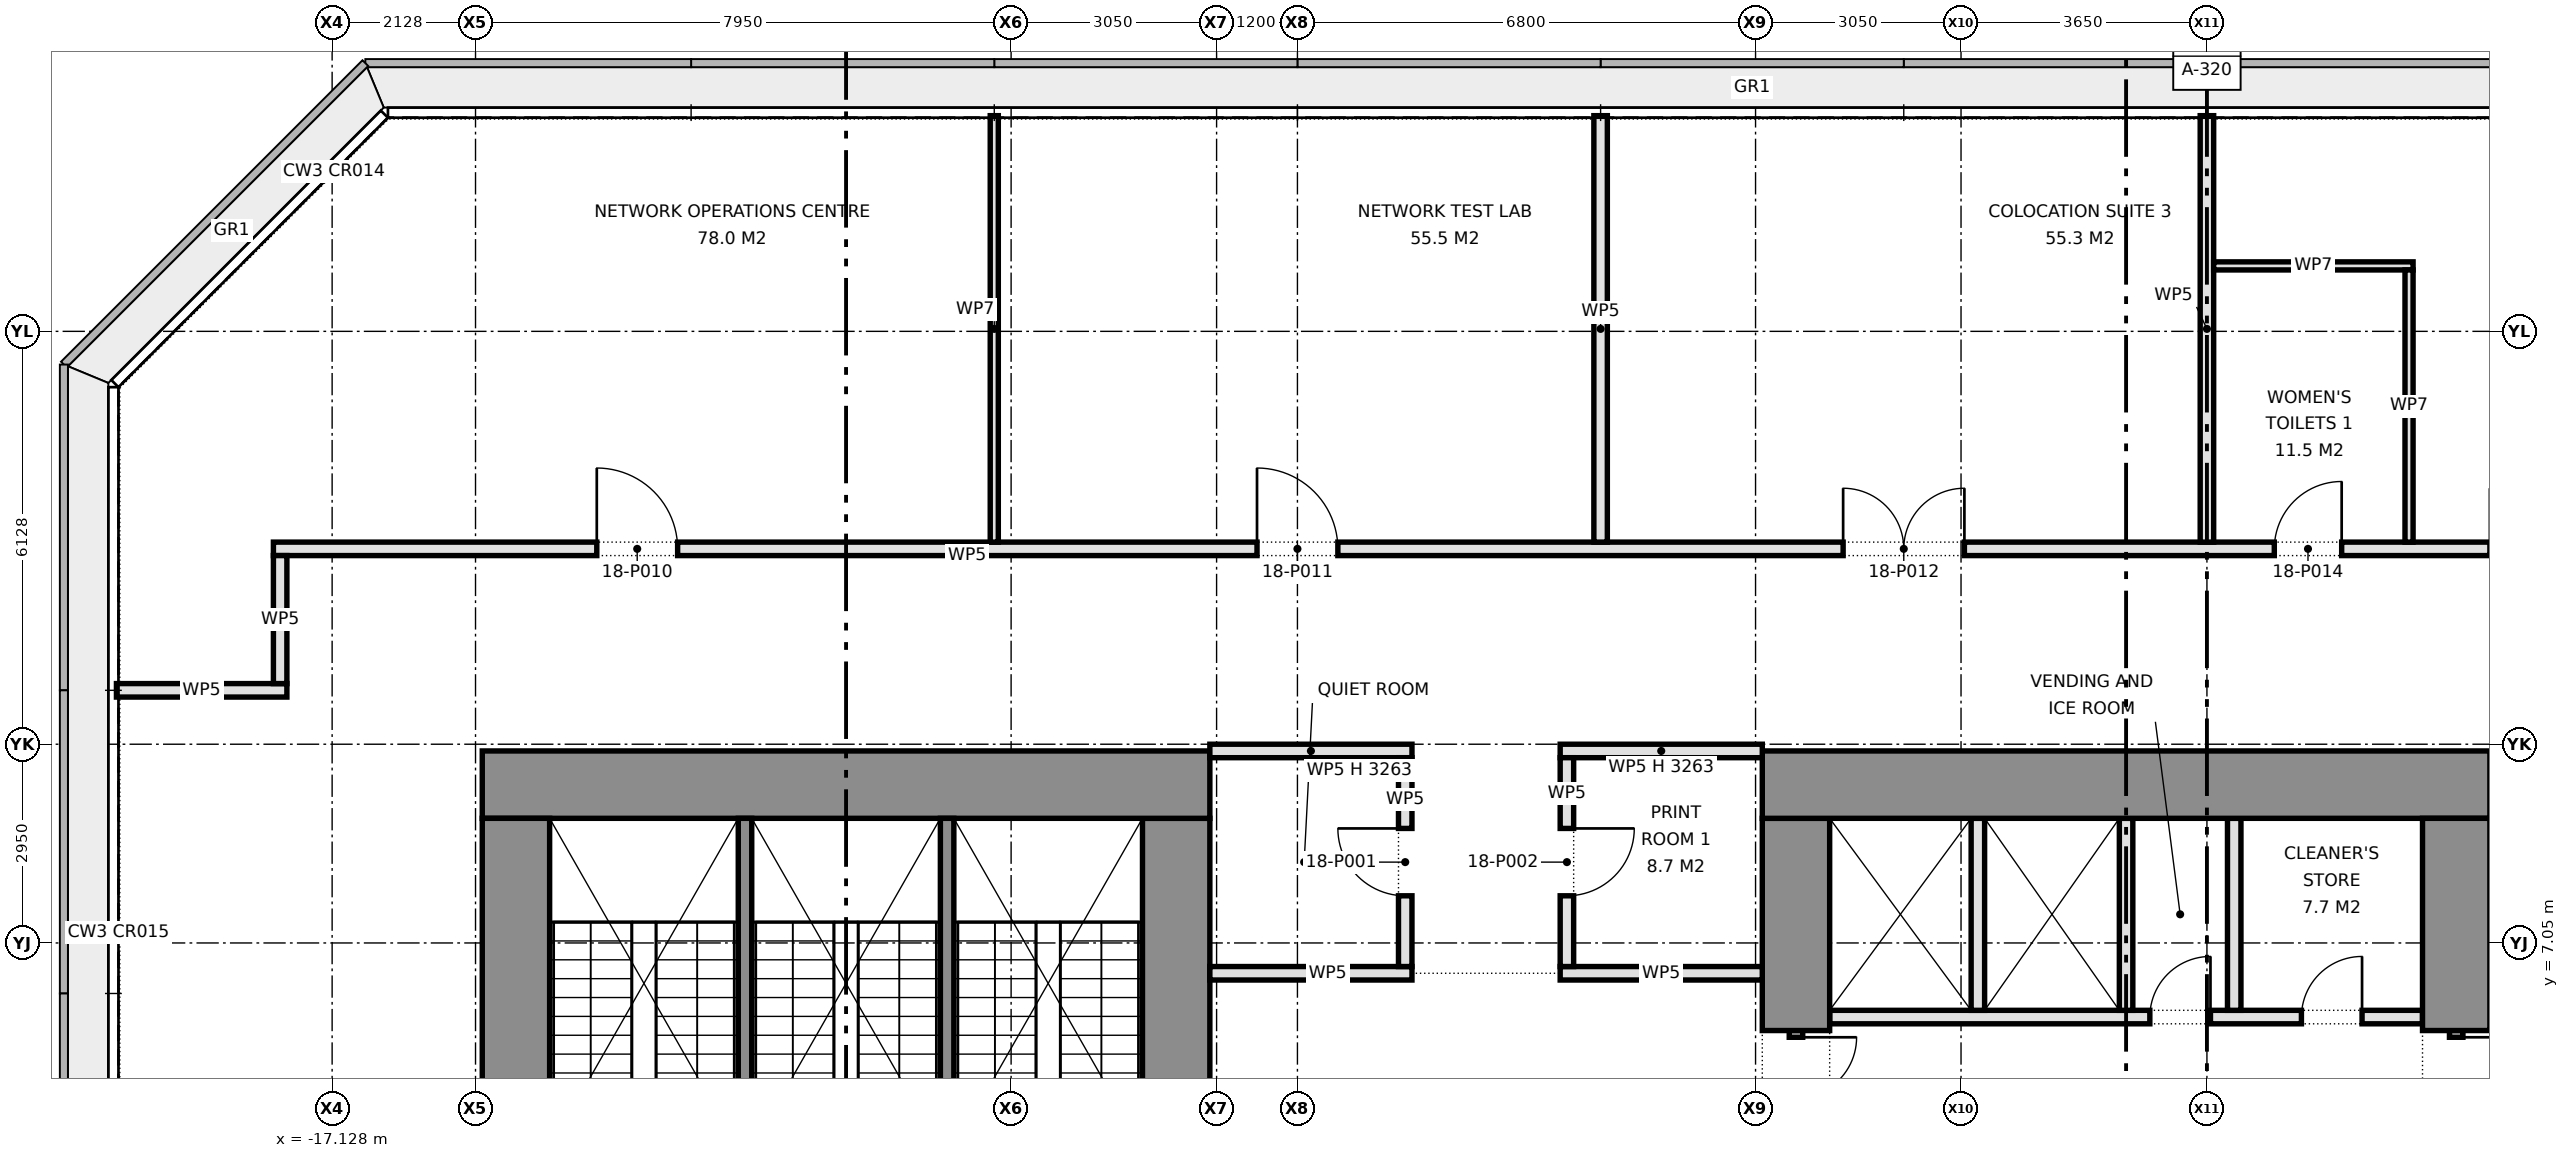
"""IFC4 building model, lengths in metres.
Left out: names, types, materials, properties, quantities, classifications, styles, units other than length and angle.
Written with IfcOpenShell. Run it as: python <this file> out.ifc"""

import sys

from ifc_helpers import new_model, si_unit, direction, frame, frame_2d, origin, place, context, subcontext, project, spatial, rectangle, extrude, element, fill, save


model = new_model("IFC4")
c1 = context("Model", 3, precision=1e-05, world=origin(), true_north=direction((0.0, 1.0)))
c2 = subcontext(c1, "Body", "Model", "MODEL_VIEW")
j1 = project(units=[si_unit("LENGTHUNIT", "METRE"), si_unit("PLANEANGLEUNIT", "RADIAN")], contexts=[c1])
p1 = place(None, origin())
s1 = spatial("IfcSite", under=j1, at=p1, CompositionType="ELEMENT")
p2 = place(p1, origin())
s2 = spatial("IfcBuilding", under=s1, at=p2, CompositionType="ELEMENT")
p3 = place(p2, frame((0.0, 0.0, 82.0)))
s3 = spatial("IfcBuildingStorey", under=s2, at=p3, CompositionType="ELEMENT", Elevation=82.0)
p4 = place(p3, frame((-14.9, 9.4, 0.0), z_axis=(0.0, 0.0, 1.0), x_axis=(1.0, 0.0, 0.0)))
e1 = element("IfcWall", 1, at=p4, inside=s3, PredefinedType="SHEAR", context=c2, shape_type="SweptSolid", body=[
    extrude(rectangle(XDim=10.8, YDim=1.0, at=frame_2d((5.4, 0.0))), origin(), (0.0, 0.0, 1.0), 4.2),
])
p5 = place(p3, frame((-14.4, 3.68, 0.0), z_axis=(0.0, 0.0, 1.0), x_axis=(0.0, 1.0, 0.0)))
e2 = element("IfcWall", 2, at=p5, inside=s3, PredefinedType="SHEAR", context=c2, shape_type="SweptSolid", body=[
    extrude(rectangle(XDim=5.22, YDim=1.0, at=frame_2d((2.61, 0.0))), origin(), (0.0, 0.0, 1.0), 4.2),
])
p6 = place(p3, frame((-4.6, 1.55, 0.0), z_axis=(0.0, 0.0, 1.0), x_axis=(0.0, 1.0, 0.0)))
e3 = element("IfcWall", 3, at=p6, inside=s3, PredefinedType="SHEAR", context=c2, shape_type="SweptSolid", body=[
    extrude(rectangle(XDim=7.35, YDim=1.0, at=frame_2d((3.675, 0.0))), origin(), (0.0, 0.0, 1.0), 4.2),
])
for number, where, z_axis, x_axis in (
    (4, (-11.0, 2.38, 0.0), (0.0, 0.0, 1.0), (0.0, 1.0, 0.0)),
    (5, (-8.0, 2.38, 0.0), (0.0, 0.0, 1.0), (0.0, 1.0, 0.0)),
):
    element("IfcWall", number, at=place(p3, frame(where, z_axis=z_axis, x_axis=x_axis)), inside=s3, PredefinedType="SHEAR", context=c2, shape_type="SweptSolid", body=[
        extrude(rectangle(XDim=6.52, YDim=0.2, at=frame_2d((3.26, 0.0))), origin(), (0.0, 0.0, 1.0), 4.2),
    ])
p7 = place(p3, frame((14.9, 9.4, 0.0), z_axis=(0.0, 0.0, 1.0), x_axis=(-1.0, 0.0, 0.0)))
e6 = element("IfcWall", 6, at=p7, inside=s3, PredefinedType="SHEAR", context=c2, shape_type="SweptSolid", body=[
    extrude(rectangle(XDim=10.8, YDim=1.0, at=frame_2d((5.4, 0.0))), origin(), (0.0, 0.0, 1.0), 4.2),
])
p8 = place(p3, frame((14.4, 8.9, 0.0), z_axis=(0.0, 0.0, 1.0), x_axis=(0.0, -1.0, 0.0)))
e7 = element("IfcWall", 7, at=p8, inside=s3, PredefinedType="SHEAR", context=c2, shape_type="SweptSolid", body=[
    extrude(rectangle(XDim=3.15, YDim=1.0, at=frame_2d((1.575, 0.0))), origin(), (0.0, 0.0, 1.0), 4.2),
])
p9 = place(p3, frame((14.4, 5.75, 0.0), z_axis=(0.0, 0.0, 1.0), x_axis=(0.0, -1.0, 0.0)))
e8 = element("IfcWall", 8, at=p9, inside=s3, PredefinedType="PARTITIONING", context=c2, shape_type="SweptSolid", body=[
    extrude(rectangle(XDim=2.0, YDim=0.2, at=frame_2d((1.0, 0.0))), origin(), (0.0, 0.0, 1.0), 2.4),
])
p10 = place(p9, frame((0.1, 0.0, 0.0)))
e9 = element("IfcOpeningElement", 9, at=p10, cuts=e8, PredefinedType="OPENING", context=c2, shape_type="SweptSolid", body=[
    extrude(rectangle(XDim=1.8, YDim=2.1, at=frame_2d((0.9, 1.05))), frame((0.0, 0.11, 0.0), z_axis=(0.0, -1.0, 0.0), x_axis=(1.0, 0.0, 0.0)), (0.0, 0.0, 1.0), 0.22),
])
p11 = place(p3, frame((4.6, 8.9, 0.0), z_axis=(0.0, 0.0, 1.0), x_axis=(0.0, -1.0, 0.0)))
e10 = element("IfcWall", 10, at=p11, inside=s3, PredefinedType="SHEAR", context=c2, shape_type="SweptSolid", body=[
    extrude(rectangle(XDim=3.15, YDim=1.0, at=frame_2d((1.575, 0.0))), origin(), (0.0, 0.0, 1.0), 4.2),
])
p12 = place(p3, frame((4.6, 5.75, 0.0), z_axis=(0.0, 0.0, 1.0), x_axis=(0.0, -1.0, 0.0)))
e11 = element("IfcWall", 11, at=p12, inside=s3, PredefinedType="PARTITIONING", context=c2, shape_type="SweptSolid", body=[
    extrude(rectangle(XDim=2.0, YDim=0.2, at=frame_2d((1.0, 0.0))), origin(), (0.0, 0.0, 1.0), 2.4),
])
p13 = place(p12, frame((0.1, 0.0, 0.0)))
e12 = element("IfcOpeningElement", 12, at=p13, cuts=e11, PredefinedType="OPENING", context=c2, shape_type="SweptSolid", body=[
    extrude(rectangle(XDim=1.8, YDim=2.1, at=frame_2d((0.9, 1.05))), frame((0.0, 0.11, 0.0), z_axis=(0.0, -1.0, 0.0), x_axis=(1.0, 0.0, 0.0)), (0.0, 0.0, 1.0), 0.22),
])
p14 = place(p3, frame((13.9, 5.95, 0.0), z_axis=(0.0, 0.0, 1.0), x_axis=(-1.0, 0.0, 0.0)))
e13 = element("IfcWall", 13, at=p14, inside=s3, PredefinedType="PARTITIONING", context=c2, shape_type="SweptSolid", body=[
    extrude(rectangle(XDim=8.8, YDim=0.2, at=frame_2d((4.4, 0.0))), origin(), (0.0, 0.0, 1.0), 4.2),
])
p15 = place(p14, frame((0.897, 0.0, 0.0)))
e14 = element("IfcOpeningElement", 14, at=p15, cuts=e13, PredefinedType="OPENING", context=c2, shape_type="SweptSolid", body=[
    extrude(rectangle(XDim=0.9, YDim=2.1, at=frame_2d((0.45, 1.05))), frame((0.0, 0.11, 0.0), z_axis=(0.0, -1.0, 0.0), x_axis=(1.0, 0.0, 0.0)), (0.0, 0.0, 1.0), 0.22),
])
p16 = place(p14, frame((3.147, 0.0, 0.0)))
e15 = element("IfcOpeningElement", 15, at=p16, cuts=e13, PredefinedType="OPENING", context=c2, shape_type="SweptSolid", body=[
    extrude(rectangle(XDim=0.9, YDim=2.1, at=frame_2d((0.45, 1.05))), frame((0.0, 0.11, 0.0), z_axis=(0.0, -1.0, 0.0), x_axis=(1.0, 0.0, 0.0)), (0.0, 0.0, 1.0), 0.22),
])
for number, where, z_axis, x_axis in (
    (16, (9.5, 8.9, 0.0), (0.0, 0.0, 1.0), (0.0, -1.0, 0.0)),
    (17, (7.3, 8.9, 0.0), (0.0, 0.0, 1.0), (0.0, -1.0, 0.0)),
    (18, (11.105, 8.9, 0.0), (0.0, 0.0, 1.0), (0.0, -1.0, 0.0)),
):
    element("IfcWall", number, at=place(p3, frame(where, z_axis=z_axis, x_axis=x_axis)), inside=s3, PredefinedType="PARTITIONING", context=c2, shape_type="SweptSolid", body=[
        extrude(rectangle(XDim=2.85, YDim=0.2, at=frame_2d((1.425, 0.0))), origin(), (0.0, 0.0, 1.0), 4.2),
    ])
for number, where, z_axis, x_axis in (
    (19, (-4.1, 6.6, 0.0), (0.0, 0.0, 1.0), (1.0, 0.0, 0.0)),
    (20, (1.1, 6.6, 0.0), (0.0, 0.0, 1.0), (1.0, 0.0, 0.0)),
):
    element("IfcWall", number, at=place(p3, frame(where, z_axis=z_axis, x_axis=x_axis)), inside=s3, PredefinedType="PARTITIONING", context=c2, shape_type="SweptSolid", body=[
        extrude(rectangle(XDim=3.0, YDim=0.2, at=frame_2d((1.5, 0.0))), origin(), (0.0, 0.0, 1.0), 4.2),
    ])
for number, where, z_axis, x_axis in (
    (21, (-4.1, 9.9, 0.0), (0.0, 0.0, 1.0), (1.0, 0.0, 0.0)),
    (22, (1.1, 9.9, 0.0), (0.0, 0.0, 1.0), (1.0, 0.0, 0.0)),
):
    element("IfcWall", number, at=place(p3, frame(where, z_axis=z_axis, x_axis=x_axis)), inside=s3, PredefinedType="PARTITIONING", context=c2, shape_type="SweptSolid", body=[
        extrude(rectangle(XDim=3.0, YDim=0.2, at=frame_2d((1.5, 0.0))), origin(), (0.0, 0.0, 1.0), 3.263),
    ])
p17 = place(p3, frame((-20.33, 10.8, 0.0), z_axis=(0.0, 0.0, 1.0), x_axis=(1.0, 0.0, 0.0)))
e23 = element("IfcWall", 23, at=p17, inside=s3, PredefinedType="PARTITIONING", context=c2, shape_type="SweptSolid", body=[
    extrude(rectangle(XDim=2.53, YDim=0.2, at=frame_2d((1.265, 0.0))), origin(), (0.0, 0.0, 1.0), 4.2),
])
p18 = place(p3, frame((-18.0, 12.9, 0.0), z_axis=(0.0, 0.0, 1.0), x_axis=(1.0, 0.0, 0.0)))
e24 = element("IfcWall", 24, at=p18, inside=s3, PredefinedType="PARTITIONING", context=c2, shape_type="SweptSolid", body=[
    extrude(rectangle(XDim=36.0, YDim=0.2, at=frame_2d((18.0, 0.0))), origin(), (0.0, 0.0, 1.0), 4.2),
])
p19 = place(p18, frame((4.8, 0.0, 0.0)))
e25 = element("IfcOpeningElement", 25, at=p19, cuts=e24, PredefinedType="OPENING", context=c2, shape_type="SweptSolid", body=[
    extrude(rectangle(XDim=1.2, YDim=2.1, at=frame_2d((0.6, 1.05))), frame((0.0, 0.11, 0.0), z_axis=(0.0, -1.0, 0.0), x_axis=(1.0, 0.0, 0.0)), (0.0, 0.0, 1.0), 0.22),
])
p20 = place(p18, frame((14.6, 0.0, 0.0)))
e26 = element("IfcOpeningElement", 26, at=p20, cuts=e24, PredefinedType="OPENING", context=c2, shape_type="SweptSolid", body=[
    extrude(rectangle(XDim=1.2, YDim=2.1, at=frame_2d((0.6, 1.05))), frame((0.0, 0.11, 0.0), z_axis=(0.0, -1.0, 0.0), x_axis=(1.0, 0.0, 0.0)), (0.0, 0.0, 1.0), 0.22),
])
p21 = place(p18, frame((23.3, 0.0, 0.0)))
e27 = element("IfcOpeningElement", 27, at=p21, cuts=e24, PredefinedType="OPENING", context=c2, shape_type="SweptSolid", body=[
    extrude(rectangle(XDim=1.8, YDim=2.1, at=frame_2d((0.9, 1.05))), frame((0.0, 0.11, 0.0), z_axis=(0.0, -1.0, 0.0), x_axis=(1.0, 0.0, 0.0)), (0.0, 0.0, 1.0), 0.22),
])
p22 = place(p18, frame((32.9, 0.0, 0.0)))
e28 = element("IfcOpeningElement", 28, at=p22, cuts=e24, PredefinedType="OPENING", context=c2, shape_type="SweptSolid", body=[
    extrude(rectangle(XDim=1.8, YDim=2.1, at=frame_2d((0.9, 1.05))), frame((0.0, 0.11, 0.0), z_axis=(0.0, -1.0, 0.0), x_axis=(1.0, 0.0, 0.0)), (0.0, 0.0, 1.0), 0.22),
])
p23 = place(p18, frame((29.7, 0.0, 0.0)))
e29 = element("IfcOpeningElement", 29, at=p23, cuts=e24, PredefinedType="OPENING", context=c2, shape_type="SweptSolid", body=[
    extrude(rectangle(XDim=1.0, YDim=2.1, at=frame_2d((0.5, 1.05))), frame((0.0, 0.11, 0.0), z_axis=(0.0, -1.0, 0.0), x_axis=(1.0, 0.0, 0.0)), (0.0, 0.0, 1.0), 0.22),
])
for number, where, z_axis, x_axis in (
    (30, (10.7, 13.0, 0.0), (0.0, 0.0, 1.0), (0.0, 1.0, 0.0)),
    (31, (1.7, 13.0, 0.0), (0.0, 0.0, 1.0), (0.0, 1.0, 0.0)),
):
    element("IfcWall", number, at=place(p3, frame(where, z_axis=z_axis, x_axis=x_axis)), inside=s3, PredefinedType="PARTITIONING", context=c2, shape_type="SweptSolid", body=[
        extrude(rectangle(XDim=6.33, YDim=0.2, at=frame_2d((3.165, 0.0))), origin(), (0.0, 0.0, 1.0), 4.2),
    ])
p24 = place(p3, frame((1.2, 6.7, 0.0), z_axis=(0.0, 0.0, 1.0), x_axis=(0.0, 1.0, 0.0)))
e32 = element("IfcWall", 32, at=p24, inside=s3, PredefinedType="PARTITIONING", context=c2, shape_type="SweptSolid", body=[
    extrude(rectangle(XDim=3.1, YDim=0.2, at=frame_2d((1.55, 0.0))), origin(), (0.0, 0.0, 1.0), 4.2),
])
p25 = place(p24, frame((1.05, 0.0, 0.0)))
e33 = element("IfcOpeningElement", 33, at=p25, cuts=e32, PredefinedType="OPENING", context=c2, shape_type="SweptSolid", body=[
    extrude(rectangle(XDim=1.0, YDim=2.1, at=frame_2d((0.5, 1.05))), frame((0.0, 0.11, 0.0), z_axis=(0.0, -1.0, 0.0), x_axis=(1.0, 0.0, 0.0)), (0.0, 0.0, 1.0), 0.22),
])
p26 = place(p3, frame((-1.2, 6.7, 0.0), z_axis=(0.0, 0.0, 1.0), x_axis=(0.0, 1.0, 0.0)))
e34 = element("IfcWall", 34, at=p26, inside=s3, PredefinedType="PARTITIONING", context=c2, shape_type="SweptSolid", body=[
    extrude(rectangle(XDim=3.1, YDim=0.2, at=frame_2d((1.55, 0.0))), origin(), (0.0, 0.0, 1.0), 4.2),
])
p27 = place(p26, frame((1.05, 0.0, 0.0)))
e35 = element("IfcOpeningElement", 35, at=p27, cuts=e34, PredefinedType="OPENING", context=c2, shape_type="SweptSolid", body=[
    extrude(rectangle(XDim=1.0, YDim=2.1, at=frame_2d((0.5, 1.05))), frame((0.0, 0.11, 0.0), z_axis=(0.0, -1.0, 0.0), x_axis=(1.0, 0.0, 0.0)), (0.0, 0.0, 1.0), 0.22),
])
p28 = place(p3, frame((-17.9, 10.9, 0.0), z_axis=(0.0, 0.0, 1.0), x_axis=(0.0, 1.0, 0.0)))
e36 = element("IfcWall", 36, at=p28, inside=s3, PredefinedType="PARTITIONING", context=c2, shape_type="SweptSolid", body=[
    extrude(rectangle(XDim=1.9, YDim=0.2, at=frame_2d((0.95, 0.0))), origin(), (0.0, 0.0, 1.0), 4.2),
])
p29 = place(p3, frame((10.8, 17.1, 0.0), z_axis=(0.0, 0.0, 1.0), x_axis=(1.0, 0.0, 0.0)))
e37 = element("IfcWall", 37, at=p29, inside=s3, PredefinedType="PARTITIONING", context=c2, shape_type="SweptSolid", body=[
    extrude(rectangle(XDim=2.96, YDim=0.12, at=frame_2d((1.48, 0.0))), origin(), (0.0, 0.0, 1.0), 4.2),
])
p30 = place(p3, frame((13.7, 13.0, 0.0), z_axis=(0.0, 0.0, 1.0), x_axis=(0.0, 1.0, 0.0)))
e38 = element("IfcWall", 38, at=p30, inside=s3, PredefinedType="PARTITIONING", context=c2, shape_type="SweptSolid", body=[
    extrude(rectangle(XDim=4.04, YDim=0.12, at=frame_2d((2.02, 0.0))), origin(), (0.0, 0.0, 1.0), 4.2),
])
p31 = place(p3, frame((-7.3, 13.0, 0.0), z_axis=(0.0, 0.0, 1.0), x_axis=(0.0, 1.0, 0.0)))
e39 = element("IfcWall", 39, at=p31, inside=s3, PredefinedType="PARTITIONING", context=c2, shape_type="SweptSolid", body=[
    extrude(rectangle(XDim=6.33, YDim=0.12, at=frame_2d((3.165, 0.0))), origin(), (0.0, 0.0, 1.0), 4.2),
])
p32 = place(p10, origin())
e40 = element("IfcDoor", 40, at=p32, inside=s3, OperationType="DOUBLE_DOOR_SINGLE_SWING", PredefinedType="DOOR", context=c2, shape_type="SweptSolid", body=[
    extrude(rectangle(XDim=1.8, YDim=2.1, at=frame_2d((0.9, 1.05))), frame((0.0, 0.025, 0.0), z_axis=(0.0, -1.0, 0.0), x_axis=(1.0, 0.0, 0.0)), (0.0, 0.0, 1.0), 0.05),
])
fill(e9, e40)
p33 = place(p13, origin())
e41 = element("IfcDoor", 41, at=p33, inside=s3, OperationType="DOUBLE_DOOR_SINGLE_SWING", PredefinedType="DOOR", context=c2, shape_type="SweptSolid", body=[
    extrude(rectangle(XDim=1.8, YDim=2.1, at=frame_2d((0.9, 1.05))), frame((0.0, 0.025, 0.0), z_axis=(0.0, -1.0, 0.0), x_axis=(1.0, 0.0, 0.0)), (0.0, 0.0, 1.0), 0.05),
])
fill(e12, e41)
p34 = place(p15, frame((0.9, 0.0, 0.0), z_axis=(0.0, 0.0, 1.0), x_axis=(-1.0, 0.0, 0.0)))
e42 = element("IfcDoor", 42, at=p34, inside=s3, OperationType="SINGLE_SWING_RIGHT", PredefinedType="DOOR", context=c2, shape_type="SweptSolid", body=[
    extrude(rectangle(XDim=0.9, YDim=2.1, at=frame_2d((0.45, 1.05))), frame((0.0, 0.025, 0.0), z_axis=(0.0, -1.0, 0.0), x_axis=(1.0, 0.0, 0.0)), (0.0, 0.0, 1.0), 0.05),
])
fill(e14, e42)
p35 = place(p16, frame((0.9, 0.0, 0.0), z_axis=(0.0, 0.0, 1.0), x_axis=(-1.0, 0.0, 0.0)))
e43 = element("IfcDoor", 43, at=p35, inside=s3, OperationType="SINGLE_SWING_RIGHT", PredefinedType="DOOR", context=c2, shape_type="SweptSolid", body=[
    extrude(rectangle(XDim=0.9, YDim=2.1, at=frame_2d((0.45, 1.05))), frame((0.0, 0.025, 0.0), z_axis=(0.0, -1.0, 0.0), x_axis=(1.0, 0.0, 0.0)), (0.0, 0.0, 1.0), 0.05),
])
fill(e15, e43)
p36 = place(p27, origin())
e44 = element("IfcDoor", 44, at=p36, inside=s3, OperationType="SINGLE_SWING_RIGHT", PredefinedType="DOOR", context=c2, shape_type="SweptSolid", body=[
    extrude(rectangle(XDim=1.0, YDim=2.1, at=frame_2d((0.5, 1.05))), frame((0.0, 0.025, 0.0), z_axis=(0.0, -1.0, 0.0), x_axis=(1.0, 0.0, 0.0)), (0.0, 0.0, 1.0), 0.05),
])
fill(e35, e44)
p37 = place(p25, frame((1.0, 0.0, 0.0), z_axis=(0.0, 0.0, 1.0), x_axis=(-1.0, 0.0, 0.0)))
e45 = element("IfcDoor", 45, at=p37, inside=s3, OperationType="SINGLE_SWING_LEFT", PredefinedType="DOOR", context=c2, shape_type="SweptSolid", body=[
    extrude(rectangle(XDim=1.0, YDim=2.1, at=frame_2d((0.5, 1.05))), frame((0.0, 0.025, 0.0), z_axis=(0.0, -1.0, 0.0), x_axis=(1.0, 0.0, 0.0)), (0.0, 0.0, 1.0), 0.05),
])
fill(e33, e45)
p38 = place(p19, origin())
e46 = element("IfcDoor", 46, at=p38, inside=s3, OperationType="SINGLE_SWING_LEFT", PredefinedType="DOOR", context=c2, shape_type="SweptSolid", body=[
    extrude(rectangle(XDim=1.2, YDim=2.1, at=frame_2d((0.6, 1.05))), frame((0.0, 0.025, 0.0), z_axis=(0.0, -1.0, 0.0), x_axis=(1.0, 0.0, 0.0)), (0.0, 0.0, 1.0), 0.05),
])
fill(e25, e46)
p39 = place(p20, origin())
e47 = element("IfcDoor", 47, at=p39, inside=s3, OperationType="SINGLE_SWING_LEFT", PredefinedType="DOOR", context=c2, shape_type="SweptSolid", body=[
    extrude(rectangle(XDim=1.2, YDim=2.1, at=frame_2d((0.6, 1.05))), frame((0.0, 0.025, 0.0), z_axis=(0.0, -1.0, 0.0), x_axis=(1.0, 0.0, 0.0)), (0.0, 0.0, 1.0), 0.05),
])
fill(e26, e47)
p40 = place(p21, origin())
e48 = element("IfcDoor", 48, at=p40, inside=s3, OperationType="DOUBLE_DOOR_SINGLE_SWING", PredefinedType="DOOR", context=c2, shape_type="SweptSolid", body=[
    extrude(rectangle(XDim=1.8, YDim=2.1, at=frame_2d((0.9, 1.05))), frame((0.0, 0.025, 0.0), z_axis=(0.0, -1.0, 0.0), x_axis=(1.0, 0.0, 0.0)), (0.0, 0.0, 1.0), 0.05),
])
fill(e27, e48)
p41 = place(p22, origin())
e49 = element("IfcDoor", 49, at=p41, inside=s3, OperationType="DOUBLE_DOOR_SINGLE_SWING", PredefinedType="DOOR", context=c2, shape_type="SweptSolid", body=[
    extrude(rectangle(XDim=1.8, YDim=2.1, at=frame_2d((0.9, 1.05))), frame((0.0, 0.025, 0.0), z_axis=(0.0, -1.0, 0.0), x_axis=(1.0, 0.0, 0.0)), (0.0, 0.0, 1.0), 0.05),
])
fill(e28, e49)
p42 = place(p23, origin())
e50 = element("IfcDoor", 50, at=p42, inside=s3, OperationType="SINGLE_SWING_RIGHT", PredefinedType="DOOR", context=c2, shape_type="SweptSolid", body=[
    extrude(rectangle(XDim=1.0, YDim=2.1, at=frame_2d((0.5, 1.05))), frame((0.0, 0.025, 0.0), z_axis=(0.0, -1.0, 0.0), x_axis=(1.0, 0.0, 0.0)), (0.0, 0.0, 1.0), 0.05),
])
fill(e29, e50)
save(model, sys.argv[1])
